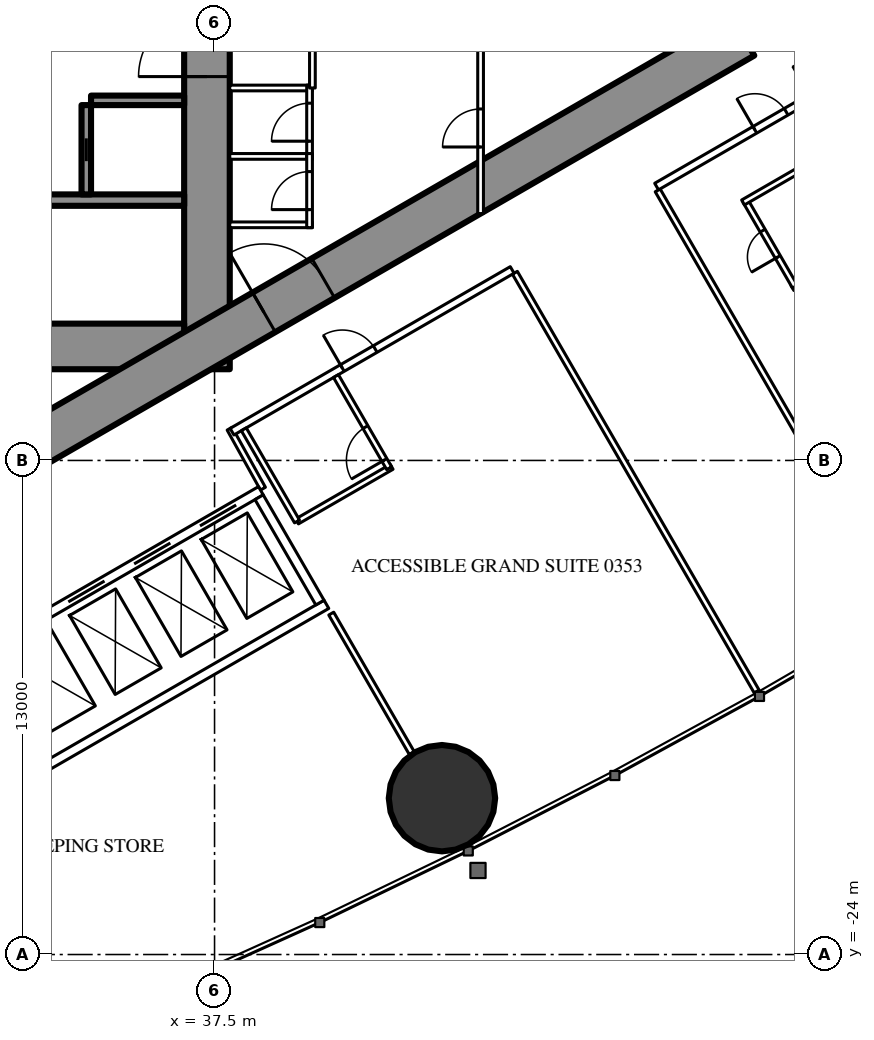
"""IFC4 building model, lengths in metres.
Left out: names, types, materials, properties, quantities, classifications, styles, units other than length and angle.
Written with IfcOpenShell. Run it as: python <this file> out.ifc"""

import sys

from ifc_helpers import new_model, si_unit, direction, frame, frame_2d, origin, origin_2d, place, context, subcontext, project, spatial, rectangle, hollow_circle, extrude, element, fill, save


model = new_model("IFC4")
c1 = context("Model", 3, precision=1e-05, world=origin(), true_north=direction((0.0, 1.0)))
c2 = subcontext(c1, "Body", "Model", "MODEL_VIEW")
j1 = project(units=[si_unit("LENGTHUNIT", "METRE"), si_unit("PLANEANGLEUNIT", "RADIAN")], contexts=[c1])
p1 = place(None, origin())
s1 = spatial("IfcSite", under=j1, at=p1, CompositionType="ELEMENT")
p2 = place(p1, origin())
s2 = spatial("IfcBuilding", under=s1, at=p2, CompositionType="ELEMENT")
p3 = place(p2, frame((0.0, 0.0, 18.0)))
s3 = spatial("IfcBuildingStorey", under=s2, at=p3, CompositionType="ELEMENT", Elevation=18.0)
p4 = place(p3, frame((43.484, -19.886, 0.0), z_axis=(0.0, 0.0, 1.0), x_axis=(1.0, 0.0, 0.0)))
e1 = element("IfcColumn", 1, at=p4, inside=s3, PredefinedType="COLUMN", context=c2, shape_type="SweptSolid", body=[
    extrude(hollow_circle(Radius=1.4, WallThickness=0.12, at=origin_2d()), origin(), (0.0, 0.0, 1.0), 3.5),
])
p5 = place(p3, frame((37.3, -8.6, 0.0), z_axis=(0.0, 0.0, 1.0), x_axis=(0.0, 1.0, 0.0)))
e2 = element("IfcWall", 2, at=p5, inside=s3, PredefinedType="SHEAR", context=c2, shape_type="SweptSolid", body=[
    extrude(rectangle(XDim=17.2, YDim=1.2, at=frame_2d((8.6, 0.0))), origin(), (0.0, 0.0, 1.0), 3.5),
])
p6 = place(p5, frame((7.7, 0.0, 0.0)))
e3 = element("IfcOpeningElement", 3, at=p6, cuts=e2, PredefinedType="OPENING", context=c2, shape_type="SweptSolid", body=[
    extrude(rectangle(XDim=1.8, YDim=2.2, at=frame_2d((0.9, 1.1))), frame((0.0, 0.61, 0.0), z_axis=(0.0, -1.0, 0.0), x_axis=(1.0, 0.0, 0.0)), (0.0, 0.0, 1.0), 1.22),
])
p7 = place(p3, frame((28.3, -8.0, 0.0), z_axis=(0.0, 0.0, 1.0), x_axis=(1.0, 0.0, 0.0)))
e4 = element("IfcWall", 4, at=p7, inside=s3, PredefinedType="SHEAR", context=c2, shape_type="SweptSolid", body=[
    extrude(rectangle(XDim=8.4, YDim=1.2, at=frame_2d((4.2, 0.0))), origin(), (0.0, 0.0, 1.0), 3.5),
])
p8 = place(p7, frame((0.25, 0.0, 0.0)))
e5 = element("IfcOpeningElement", 5, at=p8, cuts=e4, PredefinedType="OPENING", context=c2, shape_type="SweptSolid", body=[
    extrude(rectangle(XDim=1.0, YDim=2.2, at=frame_2d((0.5, 1.1))), frame((0.0, 0.61, 0.0), z_axis=(0.0, -1.0, 0.0), x_axis=(1.0, 0.0, 0.0)), (0.0, 0.0, 1.0), 1.22),
])
p9 = place(p3, frame((28.3, -4.15, 0.0), z_axis=(0.0, 0.0, 1.0), x_axis=(1.0, 0.0, 0.0)))
e6 = element("IfcWall", 6, at=p9, inside=s3, PredefinedType="SHEAR", context=c2, shape_type="SweptSolid", body=[
    extrude(rectangle(XDim=8.4, YDim=0.3, at=frame_2d((4.2, 0.0))), origin(), (0.0, 0.0, 1.0), 3.5),
])
p10 = place(p3, frame((34.125, -4.0, 0.0), z_axis=(0.0, 0.0, 1.0), x_axis=(0.0, 1.0, 0.0)))
e7 = element("IfcWall", 7, at=p10, inside=s3, PredefinedType="SHEAR", context=c2, shape_type="SweptSolid", body=[
    extrude(rectangle(XDim=2.35, YDim=0.25, at=frame_2d((1.175, 0.0))), origin(), (0.0, 0.0, 1.0), 3.5),
])
p11 = place(p10, frame((0.875, 0.0, 0.0)))
e8 = element("IfcOpeningElement", 8, at=p11, cuts=e7, PredefinedType="OPENING", context=c2, shape_type="SweptSolid", body=[
    extrude(rectangle(XDim=0.6, YDim=2.0, at=frame_2d((0.3, 1.0))), frame((0.0, 0.135, 0.0), z_axis=(0.0, -1.0, 0.0), x_axis=(1.0, 0.0, 0.0)), (0.0, 0.0, 1.0), 0.27),
])
p12 = place(p3, frame((34.25, -1.525, 0.0), z_axis=(0.0, 0.0, 1.0), x_axis=(1.0, 0.0, 0.0)))
e9 = element("IfcWall", 9, at=p12, inside=s3, PredefinedType="SHEAR", context=c2, shape_type="SweptSolid", body=[
    extrude(rectangle(XDim=2.45, YDim=0.25, at=frame_2d((1.225, 0.0))), origin(), (0.0, 0.0, 1.0), 3.5),
])
p13 = place(p3, frame((27.2, -13.8, 0.0), z_axis=(0.0, 0.0, 1.0), x_axis=(0.866027159892, 0.499996958321, 0.0)))
e10 = element("IfcWall", 10, at=p13, inside=s3, PredefinedType="SHEAR", context=c2, shape_type="SweptSolid", body=[
    extrude(rectangle(XDim=27.947, YDim=1.2, at=frame_2d((13.973, 0.0))), origin(), (0.0, 0.0, 1.0), 3.5),
])
p14 = place(p13, frame((4.6, 0.0, 0.0)))
e11 = element("IfcOpeningElement", 11, at=p14, cuts=e10, PredefinedType="OPENING", context=c2, shape_type="SweptSolid", body=[
    extrude(rectangle(XDim=1.0, YDim=2.2, at=frame_2d((0.5, 1.1))), frame((0.0, 0.61, 0.0), z_axis=(0.0, -1.0, 0.0), x_axis=(1.0, 0.0, 0.0)), (0.0, 0.0, 1.0), 1.22),
])
p15 = place(p13, frame((13.395, 0.0, 0.0)))
e12 = element("IfcOpeningElement", 12, at=p15, cuts=e10, PredefinedType="OPENING", context=c2, shape_type="SweptSolid", body=[
    extrude(rectangle(XDim=1.8, YDim=2.2, at=frame_2d((0.9, 1.1))), frame((0.0, 0.61, 0.0), z_axis=(0.0, -1.0, 0.0), x_axis=(1.0, 0.0, 0.0)), (0.0, 0.0, 1.0), 1.22),
])
p16 = place(p3, frame((45.403, -6.062, 0.0), z_axis=(0.0, 0.0, 1.0), x_axis=(0.500007077968, -0.866021317279, 0.0)))
e13 = element("IfcWall", 13, at=p16, inside=s3, PredefinedType="PARTITIONING", context=c2, shape_type="SweptSolid", body=[
    extrude(rectangle(XDim=12.721, YDim=0.15, at=frame_2d((6.361, 0.0))), origin(), (0.0, 0.0, 1.0), 3.25),
])
p17 = place(p3, frame((49.159, -3.893, 0.0), z_axis=(0.0, 0.0, 1.0), x_axis=(0.499998773722, -0.866026111775, 0.0)))
e14 = element("IfcWall", 14, at=p17, inside=s3, PredefinedType="PARTITIONING", context=c2, shape_type="SweptSolid", body=[
    extrude(rectangle(XDim=9.892, YDim=0.15, at=frame_2d((4.946, 0.0))), origin(), (0.0, 0.0, 1.0), 2.25),
])
p18 = place(p3, frame((40.57, -15.03, 0.0), z_axis=(0.0, 0.0, 1.0), x_axis=(0.500012993597, -0.866017901798, 0.0)))
e15 = element("IfcWall", 15, at=p18, inside=s3, PredefinedType="PARTITIONING", context=c2, shape_type="SweptSolid", body=[
    extrude(rectangle(XDim=4.243, YDim=0.15, at=frame_2d((2.122, 0.0))), origin(), (0.0, 0.0, 1.0), 3.25),
])
p19 = place(p3, frame((38.773, -11.742, 0.0), z_axis=(0.0, 0.0, 1.0), x_axis=(-0.485528096672, 0.8742210632, 0.0)))
e16 = element("IfcWall", 16, at=p19, inside=s3, PredefinedType="PARTITIONING", context=c2, shape_type="SweptSolid", body=[
    extrude(rectangle(XDim=1.805, YDim=0.15, at=frame_2d((0.903, 0.0))), origin(), (0.0, 0.0, 1.0), 3.25),
])
p20 = place(p3, frame((37.96, -10.243, 0.0), z_axis=(0.0, 0.0, 1.0), x_axis=(0.866024617314, 0.500001362204, 0.0)))
e17 = element("IfcWall", 17, at=p20, inside=s3, PredefinedType="PARTITIONING", context=c2, shape_type="SweptSolid", body=[
    extrude(rectangle(XDim=8.512, YDim=0.2, at=frame_2d((4.256, 0.0))), origin(), (0.0, 0.0, 1.0), 3.25),
])
p21 = place(p20, frame((3.35, 0.0, 0.0)))
e18 = element("IfcOpeningElement", 18, at=p21, cuts=e17, PredefinedType="OPENING", context=c2, shape_type="SweptSolid", body=[
    extrude(rectangle(XDim=1.0, YDim=2.2, at=frame_2d((0.5, 1.1))), frame((0.0, 0.11, 0.0), z_axis=(0.0, -1.0, 0.0), x_axis=(1.0, 0.0, 0.0)), (0.0, 0.0, 1.0), 0.22),
])
p22 = place(p3, frame((49.131, -3.794, 0.0), z_axis=(0.0, 0.0, 1.0), x_axis=(0.866030732979, 0.499990769451, 0.0)))
e19 = element("IfcWall", 19, at=p22, inside=s3, PredefinedType="PARTITIONING", context=c2, shape_type="SweptSolid", body=[
    extrude(rectangle(XDim=7.588, YDim=0.2, at=frame_2d((3.794, 0.0))), origin(), (0.0, 0.0, 1.0), 3.25),
])
p23 = place(p22, frame((2.986, 0.0, 0.0)))
e20 = element("IfcOpeningElement", 20, at=p23, cuts=e19, PredefinedType="OPENING", context=c2, shape_type="SweptSolid", body=[
    extrude(rectangle(XDim=0.95, YDim=2.2, at=frame_2d((0.475, 1.1))), frame((0.0, 0.11, 0.0), z_axis=(0.0, -1.0, 0.0), x_axis=(1.0, 0.0, 0.0)), (0.0, 0.0, 1.0), 0.22),
])
p24 = place(p22, frame((4.686, 0.0, 0.0)))
e21 = element("IfcOpeningElement", 21, at=p24, cuts=e19, PredefinedType="OPENING", context=c2, shape_type="SweptSolid", body=[
    extrude(rectangle(XDim=0.95, YDim=2.2, at=frame_2d((0.475, 1.1))), frame((0.0, 0.11, 0.0), z_axis=(0.0, -1.0, 0.0), x_axis=(1.0, 0.0, 0.0)), (0.0, 0.0, 1.0), 0.22),
])
p25 = place(p3, frame((52.706, -6.464, 0.0), z_axis=(0.0, 0.0, 1.0), x_axis=(0.86604923931, 0.499958713387, 0.0)))
e22 = element("IfcWall", 22, at=p25, inside=s3, PredefinedType="PARTITIONING", context=c2, shape_type="SweptSolid", body=[
    extrude(rectangle(XDim=2.475, YDim=0.15, at=frame_2d((1.237, 0.0))), origin(), (0.0, 0.0, 1.0), 3.25),
])
p26 = place(p3, frame((51.471, -4.175, 0.0), z_axis=(0.0, 0.0, 1.0), x_axis=(0.500006934395, -0.866021400173, 0.0)))
e23 = element("IfcWall", 23, at=p26, inside=s3, PredefinedType="PARTITIONING", context=c2, shape_type="SweptSolid", body=[
    extrude(rectangle(XDim=2.6, YDim=0.15, at=frame_2d((1.3, 0.0))), origin(), (0.0, 0.0, 1.0), 3.25),
])
p27 = place(p26, frame((0.9, 0.0, 0.0)))
e24 = element("IfcOpeningElement", 24, at=p27, cuts=e23, PredefinedType="OPENING", context=c2, shape_type="SweptSolid", body=[
    extrude(rectangle(XDim=0.8, YDim=2.2, at=frame_2d((0.4, 1.1))), frame((0.0, 0.085, 0.0), z_axis=(0.0, -1.0, 0.0), x_axis=(1.0, 0.0, 0.0)), (0.0, 0.0, 1.0), 0.17),
])
p28 = place(p3, frame((51.406, -4.212, 0.0), z_axis=(0.0, 0.0, 1.0), x_axis=(0.866031185235, 0.4999899861, 0.0)))
e25 = element("IfcWall", 25, at=p28, inside=s3, PredefinedType="PARTITIONING", context=c2, shape_type="SweptSolid", body=[
    extrude(rectangle(XDim=2.475, YDim=0.15, at=frame_2d((1.238, 0.0))), origin(), (0.0, 0.0, 1.0), 3.25),
])
p29 = place(p3, frame((39.67, -12.605, 0.0), z_axis=(0.0, 0.0, 1.0), x_axis=(0.866018712932, 0.500011588718, 0.0)))
e26 = element("IfcWall", 26, at=p29, inside=s3, PredefinedType="PARTITIONING", context=c2, shape_type="SweptSolid", body=[
    extrude(rectangle(XDim=2.875, YDim=0.15, at=frame_2d((1.438, 0.0))), origin(), (0.0, 0.0, 1.0), 3.25),
])
p30 = place(p3, frame((40.695, -8.78, 0.0), z_axis=(0.0, 0.0, 1.0), x_axis=(0.500049511043, -0.865996816683, 0.0)))
e27 = element("IfcWall", 27, at=p30, inside=s3, PredefinedType="PARTITIONING", context=c2, shape_type="SweptSolid", body=[
    extrude(rectangle(XDim=2.8, YDim=0.15, at=frame_2d((1.4, 0.0))), origin(), (0.0, 0.0, 1.0), 3.25),
])
p31 = place(p30, frame((1.55, 0.0, 0.0)))
e28 = element("IfcOpeningElement", 28, at=p31, cuts=e27, PredefinedType="OPENING", context=c2, shape_type="SweptSolid", body=[
    extrude(rectangle(XDim=1.0, YDim=2.2, at=frame_2d((0.5, 1.1))), frame((0.0, 0.085, 0.0), z_axis=(0.0, -1.0, 0.0), x_axis=(1.0, 0.0, 0.0)), (0.0, 0.0, 1.0), 0.17),
])
p32 = place(p3, frame((38.27, -10.18, 0.0), z_axis=(0.0, 0.0, 1.0), x_axis=(0.500049511043, -0.865996816683, 0.0)))
e29 = element("IfcWall", 29, at=p32, inside=s3, PredefinedType="PARTITIONING", context=c2, shape_type="SweptSolid", body=[
    extrude(rectangle(XDim=2.8, YDim=0.15, at=frame_2d((1.4, 0.0))), origin(), (0.0, 0.0, 1.0), 3.25),
])
for number, where, z_axis, x_axis in (
    (30, (37.9, -1.2, 0.0), (0.0, 0.0, 1.0), (1.0, 0.0, 0.0)),
    (31, (37.9, -3.0, 0.0), (0.0, 0.0, 1.0), (1.0, 0.0, 0.0)),
    (32, (37.9, -4.8, 0.0), (0.0, 0.0, 1.0), (1.0, 0.0, 0.0)),
):
    element("IfcWall", number, at=place(p3, frame(where, z_axis=z_axis, x_axis=x_axis)), inside=s3, PredefinedType="PARTITIONING", context=c2, shape_type="SweptSolid", body=[
        extrude(rectangle(XDim=2.175, YDim=0.15, at=frame_2d((1.087, 0.0))), origin(), (0.0, 0.0, 1.0), 3.25),
    ])
p33 = place(p3, frame((40.0, -3.075, 0.0), z_axis=(0.0, 0.0, 1.0), x_axis=(0.0, 1.0, 0.0)))
e33 = element("IfcWall", 33, at=p33, inside=s3, PredefinedType="PARTITIONING", context=c2, shape_type="SweptSolid", body=[
    extrude(rectangle(XDim=1.95, YDim=0.15, at=frame_2d((0.975, 0.0))), origin(), (0.0, 0.0, 1.0), 3.25),
])
p34 = place(p33, frame((0.475, 0.0, 0.0)))
e34 = element("IfcOpeningElement", 34, at=p34, cuts=e33, PredefinedType="OPENING", context=c2, shape_type="SweptSolid", body=[
    extrude(rectangle(XDim=1.0, YDim=2.2, at=frame_2d((0.5, 1.1))), frame((0.0, 0.085, 0.0), z_axis=(0.0, -1.0, 0.0), x_axis=(1.0, 0.0, 0.0)), (0.0, 0.0, 1.0), 0.17),
])
p35 = place(p3, frame((40.0, -4.875, 0.0), z_axis=(0.0, 0.0, 1.0), x_axis=(0.0, 1.0, 0.0)))
e35 = element("IfcWall", 35, at=p35, inside=s3, PredefinedType="PARTITIONING", context=c2, shape_type="SweptSolid", body=[
    extrude(rectangle(XDim=1.95, YDim=0.15, at=frame_2d((0.975, 0.0))), origin(), (0.0, 0.0, 1.0), 3.25),
])
p36 = place(p35, frame((0.475, 0.0, 0.0)))
e36 = element("IfcOpeningElement", 36, at=p36, cuts=e35, PredefinedType="OPENING", context=c2, shape_type="SweptSolid", body=[
    extrude(rectangle(XDim=1.0, YDim=2.2, at=frame_2d((0.5, 1.1))), frame((0.0, 0.085, 0.0), z_axis=(0.0, -1.0, 0.0), x_axis=(1.0, 0.0, 0.0)), (0.0, 0.0, 1.0), 0.17),
])
p37 = place(p3, frame((40.075, -1.2, 0.0), z_axis=(0.0, 0.0, 1.0), x_axis=(0.0, 1.0, 0.0)))
e37 = element("IfcWall", 37, at=p37, inside=s3, PredefinedType="PARTITIONING", context=c2, shape_type="SweptSolid", body=[
    extrude(rectangle(XDim=6.874, YDim=0.15, at=frame_2d((3.437, 0.0))), origin(), (0.0, 0.0, 1.0), 3.25),
])
p38 = place(p37, frame((2.537, 0.0, 0.0)))
e38 = element("IfcOpeningElement", 38, at=p38, cuts=e37, PredefinedType="OPENING", context=c2, shape_type="SweptSolid", body=[
    extrude(rectangle(XDim=1.8, YDim=2.2, at=frame_2d((0.9, 1.1))), frame((0.0, 0.085, 0.0), z_axis=(0.0, -1.0, 0.0), x_axis=(1.0, 0.0, 0.0)), (0.0, 0.0, 1.0), 0.17),
])
p39 = place(p3, frame((44.5, -4.505, 0.0), z_axis=(0.0, 0.0, 1.0), x_axis=(0.0, 1.0, 0.0)))
e39 = element("IfcWall", 39, at=p39, inside=s3, PredefinedType="PARTITIONING", context=c2, shape_type="SweptSolid", body=[
    extrude(rectangle(XDim=9.009, YDim=0.15, at=frame_2d((4.505, 0.0))), origin(), (0.0, 0.0, 1.0), 2.35),
])
p40 = place(p39, frame((1.752, 0.0, 0.0)))
e40 = element("IfcOpeningElement", 40, at=p40, cuts=e39, PredefinedType="OPENING", context=c2, shape_type="SweptSolid", body=[
    extrude(rectangle(XDim=1.0, YDim=2.2, at=frame_2d((0.5, 1.1))), frame((0.0, 0.085, 0.0), z_axis=(0.0, -1.0, 0.0), x_axis=(1.0, 0.0, 0.0)), (0.0, 0.0, 1.0), 0.17),
])
p41 = place(p39, frame((6.257, 0.0, 0.0)))
e41 = element("IfcOpeningElement", 41, at=p41, cuts=e39, PredefinedType="OPENING", context=c2, shape_type="SweptSolid", body=[
    extrude(rectangle(XDim=1.0, YDim=2.2, at=frame_2d((0.5, 1.1))), frame((0.0, 0.085, 0.0), z_axis=(0.0, -1.0, 0.0), x_axis=(1.0, 0.0, 0.0)), (0.0, 0.0, 1.0), 0.17),
])
p42 = place(p3, frame((31.271, -16.097, 0.0), z_axis=(0.0, 0.0, 1.0), x_axis=(0.86604045752, 0.499973925258, 0.0)))
e42 = element("IfcWall", 42, at=p42, inside=s3, PredefinedType="PARTITIONING", context=c2, shape_type="SweptSolid", body=[
    extrude(rectangle(XDim=8.6, YDim=0.25, at=frame_2d((4.3, 0.0))), origin(), (0.0, 0.0, 1.0), 3.25),
])
p43 = place(p42, frame((0.75, 0.0, 0.0)))
e43 = element("IfcOpeningElement", 43, at=p43, cuts=e42, PredefinedType="OPENING", context=c2, shape_type="SweptSolid", body=[
    extrude(rectangle(XDim=1.1, YDim=2.2, at=frame_2d((0.55, 1.1))), frame((0.0, 0.135, 0.0), z_axis=(0.0, -1.0, 0.0), x_axis=(1.0, 0.0, 0.0)), (0.0, 0.0, 1.0), 0.27),
])
p44 = place(p42, frame((2.75, 0.0, 0.0)))
e44 = element("IfcOpeningElement", 44, at=p44, cuts=e42, PredefinedType="OPENING", context=c2, shape_type="SweptSolid", body=[
    extrude(rectangle(XDim=1.1, YDim=2.2, at=frame_2d((0.55, 1.1))), frame((0.0, 0.135, 0.0), z_axis=(0.0, -1.0, 0.0), x_axis=(1.0, 0.0, 0.0)), (0.0, 0.0, 1.0), 0.27),
])
p45 = place(p42, frame((4.75, 0.0, 0.0)))
e45 = element("IfcOpeningElement", 45, at=p45, cuts=e42, PredefinedType="OPENING", context=c2, shape_type="SweptSolid", body=[
    extrude(rectangle(XDim=1.1, YDim=2.2, at=frame_2d((0.55, 1.1))), frame((0.0, 0.135, 0.0), z_axis=(0.0, -1.0, 0.0), x_axis=(1.0, 0.0, 0.0)), (0.0, 0.0, 1.0), 0.27),
])
p46 = place(p42, frame((6.75, 0.0, 0.0)))
e46 = element("IfcOpeningElement", 46, at=p46, cuts=e42, PredefinedType="OPENING", context=c2, shape_type="SweptSolid", body=[
    extrude(rectangle(XDim=1.1, YDim=2.2, at=frame_2d((0.55, 1.1))), frame((0.0, 0.135, 0.0), z_axis=(0.0, -1.0, 0.0), x_axis=(1.0, 0.0, 0.0)), (0.0, 0.0, 1.0), 0.27),
])
p47 = place(p3, frame((32.996, -19.086, 0.0), z_axis=(0.0, 0.0, 1.0), x_axis=(0.866028165386, 0.499995216735, 0.0)))
e47 = element("IfcWall", 47, at=p47, inside=s3, PredefinedType="PARTITIONING", context=c2, shape_type="SweptSolid", body=[
    extrude(rectangle(XDim=8.6, YDim=0.25, at=frame_2d((4.3, 0.0))), origin(), (0.0, 0.0, 1.0), 3.25),
])
p48 = place(p3, frame((38.673, -11.968, 0.0), z_axis=(0.0, 0.0, 1.0), x_axis=(0.499929347863, -0.866066190972, 0.0)))
e48 = element("IfcWall", 48, at=p48, inside=s3, PredefinedType="PARTITIONING", context=c2, shape_type="SweptSolid", body=[
    extrude(rectangle(XDim=3.201, YDim=0.25, at=frame_2d((1.6, 0.0))), origin(), (0.0, 0.0, 1.0), 3.25),
])
p49 = place(p27, origin())
e49 = element("IfcDoor", 49, at=p49, inside=s3, OperationType="SINGLE_SWING_RIGHT", PredefinedType="DOOR", context=c2, shape_type="SweptSolid", body=[
    extrude(rectangle(XDim=0.8, YDim=2.2, at=frame_2d((0.4, 1.1))), frame((0.0, 0.025, 0.0), z_axis=(0.0, -1.0, 0.0), x_axis=(1.0, 0.0, 0.0)), (0.0, 0.0, 1.0), 0.05),
])
fill(e24, e49)
p50 = place(p23, origin())
e50 = element("IfcDoor", 50, at=p50, inside=s3, OperationType="SINGLE_SWING_LEFT", PredefinedType="DOOR", context=c2, shape_type="SweptSolid", body=[
    extrude(rectangle(XDim=0.95, YDim=2.2, at=frame_2d((0.475, 1.1))), frame((0.0, 0.025, 0.0), z_axis=(0.0, -1.0, 0.0), x_axis=(1.0, 0.0, 0.0)), (0.0, 0.0, 1.0), 0.05),
])
fill(e20, e50)
p51 = place(p31, origin())
e51 = element("IfcDoor", 51, at=p51, inside=s3, OperationType="SINGLE_SWING_RIGHT", PredefinedType="DOOR", context=c2, shape_type="SweptSolid", body=[
    extrude(rectangle(XDim=1.0, YDim=2.2, at=frame_2d((0.5, 1.1))), frame((0.0, 0.025, 0.0), z_axis=(0.0, -1.0, 0.0), x_axis=(1.0, 0.0, 0.0)), (0.0, 0.0, 1.0), 0.05),
])
fill(e28, e51)
p52 = place(p21, origin())
e52 = element("IfcDoor", 52, at=p52, inside=s3, OperationType="SINGLE_SWING_LEFT", PredefinedType="DOOR", context=c2, shape_type="SweptSolid", body=[
    extrude(rectangle(XDim=1.0, YDim=2.2, at=frame_2d((0.5, 1.1))), frame((0.0, 0.025, 0.0), z_axis=(0.0, -1.0, 0.0), x_axis=(1.0, 0.0, 0.0)), (0.0, 0.0, 1.0), 0.05),
])
fill(e18, e52)
p53 = place(p34, origin())
e53 = element("IfcDoor", 53, at=p53, inside=s3, OperationType="SINGLE_SWING_LEFT", PredefinedType="DOOR", context=c2, shape_type="SweptSolid", body=[
    extrude(rectangle(XDim=1.0, YDim=2.2, at=frame_2d((0.5, 1.1))), frame((0.0, 0.025, 0.0), z_axis=(0.0, -1.0, 0.0), x_axis=(1.0, 0.0, 0.0)), (0.0, 0.0, 1.0), 0.05),
])
fill(e34, e53)
p54 = place(p36, origin())
e54 = element("IfcDoor", 54, at=p54, inside=s3, OperationType="SINGLE_SWING_LEFT", PredefinedType="DOOR", context=c2, shape_type="SweptSolid", body=[
    extrude(rectangle(XDim=1.0, YDim=2.2, at=frame_2d((0.5, 1.1))), frame((0.0, 0.025, 0.0), z_axis=(0.0, -1.0, 0.0), x_axis=(1.0, 0.0, 0.0)), (0.0, 0.0, 1.0), 0.05),
])
fill(e36, e54)
p55 = place(p40, origin())
e55 = element("IfcDoor", 55, at=p55, inside=s3, OperationType="SINGLE_SWING_LEFT", PredefinedType="DOOR", context=c2, shape_type="SweptSolid", body=[
    extrude(rectangle(XDim=1.0, YDim=2.2, at=frame_2d((0.5, 1.1))), frame((0.0, 0.025, 0.0), z_axis=(0.0, -1.0, 0.0), x_axis=(1.0, 0.0, 0.0)), (0.0, 0.0, 1.0), 0.05),
])
fill(e40, e55)
p56 = place(p15, origin())
e56 = element("IfcDoor", 56, at=p56, inside=s3, OperationType="DOUBLE_DOOR_SINGLE_SWING", PredefinedType="DOOR", context=c2, shape_type="SweptSolid", body=[
    extrude(rectangle(XDim=1.8, YDim=2.2, at=frame_2d((0.9, 1.1))), frame((0.0, 0.025, 0.0), z_axis=(0.0, -1.0, 0.0), x_axis=(1.0, 0.0, 0.0)), (0.0, 0.0, 1.0), 0.05),
])
fill(e12, e56)
p57 = place(p6, origin())
e57 = element("IfcDoor", 57, at=p57, inside=s3, OperationType="DOUBLE_DOOR_SINGLE_SWING", PredefinedType="DOOR", context=c2, shape_type="SweptSolid", body=[
    extrude(rectangle(XDim=1.8, YDim=2.2, at=frame_2d((0.9, 1.1))), frame((0.0, 0.025, 0.0), z_axis=(0.0, -1.0, 0.0), x_axis=(1.0, 0.0, 0.0)), (0.0, 0.0, 1.0), 0.05),
])
fill(e3, e57)
p58 = place(p11, origin())
e58 = element("IfcDoor", 58, at=p58, inside=s3, OperationType="SLIDING_TO_LEFT", PredefinedType="DOOR", context=c2, shape_type="SweptSolid", body=[
    extrude(rectangle(XDim=0.6, YDim=2.0, at=frame_2d((0.3, 1.0))), frame((0.0, 0.025, 0.0), z_axis=(0.0, -1.0, 0.0), x_axis=(1.0, 0.0, 0.0)), (0.0, 0.0, 1.0), 0.05),
])
fill(e8, e58)
p59 = place(p44, origin())
e59 = element("IfcDoor", 59, at=p59, inside=s3, OperationType="DOUBLE_DOOR_SLIDING", PredefinedType="USERDEFINED", context=c2, shape_type="SweptSolid", body=[
    extrude(rectangle(XDim=1.1, YDim=2.2, at=frame_2d((0.55, 1.1))), frame((0.0, 0.025, 0.0), z_axis=(0.0, -1.0, 0.0), x_axis=(1.0, 0.0, 0.0)), (0.0, 0.0, 1.0), 0.05),
])
fill(e44, e59)
p60 = place(p45, origin())
e60 = element("IfcDoor", 60, at=p60, inside=s3, OperationType="DOUBLE_DOOR_SLIDING", PredefinedType="USERDEFINED", context=c2, shape_type="SweptSolid", body=[
    extrude(rectangle(XDim=1.1, YDim=2.2, at=frame_2d((0.55, 1.1))), frame((0.0, 0.025, 0.0), z_axis=(0.0, -1.0, 0.0), x_axis=(1.0, 0.0, 0.0)), (0.0, 0.0, 1.0), 0.05),
])
fill(e45, e60)
p61 = place(p46, origin())
e61 = element("IfcDoor", 61, at=p61, inside=s3, OperationType="DOUBLE_DOOR_SLIDING", PredefinedType="USERDEFINED", context=c2, shape_type="SweptSolid", body=[
    extrude(rectangle(XDim=1.1, YDim=2.2, at=frame_2d((0.55, 1.1))), frame((0.0, 0.025, 0.0), z_axis=(0.0, -1.0, 0.0), x_axis=(1.0, 0.0, 0.0)), (0.0, 0.0, 1.0), 0.05),
])
fill(e46, e61)
save(model, sys.argv[1])
